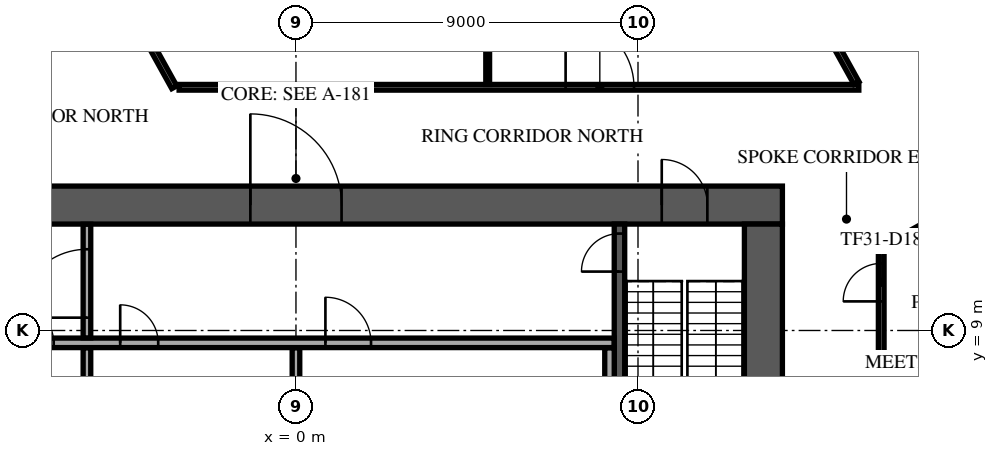
"""IFC4 building model, lengths in metres.
Left out: names, types, materials, properties, quantities, classifications, styles, units other than length and angle.
Written with IfcOpenShell. Run it as: python <this file> out.ifc"""

import sys

from ifc_helpers import new_model, si_unit, direction, frame, frame_2d, origin, place, context, subcontext, project, spatial, rectangle, extrude, element, fill, save


model = new_model("IFC4")
c1 = context("Model", 3, precision=1e-05, world=origin(), true_north=direction((0.0, 1.0)))
c2 = subcontext(c1, "Body", "Model", "MODEL_VIEW")
j1 = project(units=[si_unit("LENGTHUNIT", "METRE"), si_unit("PLANEANGLEUNIT", "RADIAN")], contexts=[c1])
p1 = place(None, origin())
s1 = spatial("IfcSite", under=j1, at=p1, CompositionType="ELEMENT")
p2 = place(p1, origin())
s2 = spatial("IfcBuilding", under=s1, at=p2, CompositionType="ELEMENT")
p3 = place(p2, frame((0.0, 0.0, 135.7)))
s3 = spatial("IfcBuildingStorey", under=s2, at=p3, CompositionType="ELEMENT", Elevation=135.7)
p4 = place(p3, frame((-12.8, 12.3, 0.0), z_axis=(0.0, 0.0, 1.0), x_axis=(1.0, 0.0, 0.0)))
e1 = element("IfcWall", 1, at=p4, inside=s3, PredefinedType="SHEAR", context=c2, shape_type="SweptSolid", body=[
    extrude(rectangle(XDim=25.6, YDim=1.0, at=frame_2d((12.8, 0.0))), origin(), (0.0, 0.0, 1.0), 3.6),
])
p5 = place(p4, frame((11.6, 0.0, 0.0)))
e2 = element("IfcOpeningElement", 2, at=p5, cuts=e1, PredefinedType="OPENING", context=c2, shape_type="SweptSolid", body=[
    extrude(rectangle(XDim=2.4, YDim=2.4, at=frame_2d((1.2, 1.2))), frame((0.0, 0.51, 0.0), z_axis=(0.0, -1.0, 0.0), x_axis=(1.0, 0.0, 0.0)), (0.0, 0.0, 1.0), 1.02),
])
p6 = place(p4, frame((22.425, 0.0, 0.0)))
e3 = element("IfcOpeningElement", 3, at=p6, cuts=e1, PredefinedType="OPENING", context=c2, shape_type="SweptSolid", body=[
    extrude(rectangle(XDim=1.2, YDim=2.1, at=frame_2d((0.6, 1.05))), frame((0.0, 0.51, 0.0), z_axis=(0.0, -1.0, 0.0), x_axis=(1.0, 0.0, 0.0)), (0.0, 0.0, 1.0), 1.02),
])
p7 = place(p4, frame((1.4, 0.0, 0.0)))
e4 = element("IfcOpeningElement", 4, at=p7, cuts=e1, PredefinedType="OPENING", context=c2, shape_type="SweptSolid", body=[
    extrude(rectangle(XDim=1.0, YDim=2.1, at=frame_2d((0.5, 1.05))), frame((0.0, 0.51, 0.0), z_axis=(0.0, -1.0, 0.0), x_axis=(1.0, 0.0, 0.0)), (0.0, 0.0, 1.0), 1.02),
])
p8 = place(p3, frame((12.3, -11.8, 0.0), z_axis=(0.0, 0.0, 1.0), x_axis=(0.0, 1.0, 0.0)))
e5 = element("IfcWall", 5, at=p8, inside=s3, PredefinedType="SHEAR", context=c2, shape_type="SweptSolid", body=[
    extrude(rectangle(XDim=23.6, YDim=1.0, at=frame_2d((11.8, 0.0))), origin(), (0.0, 0.0, 1.0), 3.6),
])
p9 = place(p8, frame((10.6, 0.0, 0.0)))
e6 = element("IfcOpeningElement", 6, at=p9, cuts=e5, PredefinedType="OPENING", context=c2, shape_type="SweptSolid", body=[
    extrude(rectangle(XDim=2.4, YDim=2.4, at=frame_2d((1.2, 1.2))), frame((0.0, 0.51, 0.0), z_axis=(0.0, -1.0, 0.0), x_axis=(1.0, 0.0, 0.0)), (0.0, 0.0, 1.0), 1.02),
])
p10 = place(p3, frame((8.512, 4.55, 0.0), z_axis=(0.0, 0.0, 1.0), x_axis=(0.0, 1.0, 0.0)))
e7 = element("IfcWall", 7, at=p10, inside=s3, PredefinedType="SOLIDWALL", context=c2, shape_type="SweptSolid", body=[
    extrude(rectangle(XDim=7.25, YDim=0.275, at=frame_2d((3.625, 0.0))), origin(), (0.0, 0.0, 1.0), 3.6),
])
p11 = place(p10, frame((6.0, 0.0, 0.0)))
e8 = element("IfcOpeningElement", 8, at=p11, cuts=e7, PredefinedType="OPENING", context=c2, shape_type="SweptSolid", body=[
    extrude(rectangle(XDim=1.0, YDim=2.1, at=frame_2d((0.5, 1.05))), frame((0.0, 0.147, 0.0), z_axis=(0.0, -1.0, 0.0), x_axis=(1.0, 0.0, 0.0)), (0.0, 0.0, 1.0), 0.295),
])
for number, where, z_axis, x_axis in (
    (9, (-5.5, 5.855, 0.0), (0.0, 0.0, 1.0), (0.0, 1.0, 0.0)),
    (10, (0.0, 5.855, 0.0), (0.0, 0.0, 1.0), (0.0, 1.0, 0.0)),
):
    element("IfcWall", number, at=place(p3, frame(where, z_axis=z_axis, x_axis=x_axis)), inside=s3, PredefinedType="PARTITIONING", context=c2, shape_type="SweptSolid", body=[
        extrude(rectangle(XDim=2.69, YDim=0.2, at=frame_2d((1.345, 0.0))), origin(), (0.0, 0.0, 1.0), 3.6),
    ])
p12 = place(p3, frame((8.25, 5.855, 0.0), z_axis=(0.0, 0.0, 1.0), x_axis=(0.0, 1.0, 0.0)))
e11 = element("IfcWall", 11, at=p12, inside=s3, PredefinedType="PARTITIONING", context=c2, shape_type="SweptSolid", body=[
    extrude(rectangle(XDim=2.69, YDim=0.25, at=frame_2d((1.345, 0.0))), origin(), (0.0, 0.0, 1.0), 3.6),
])
p13 = place(p3, frame((-8.35, 8.675, 0.0), z_axis=(0.0, 0.0, 1.0), x_axis=(1.0, 0.0, 0.0)))
e12 = element("IfcWall", 12, at=p13, inside=s3, PredefinedType="PARTITIONING", context=c2, shape_type="SweptSolid", body=[
    extrude(rectangle(XDim=16.72, YDim=0.25, at=frame_2d((8.36, 0.0))), origin(), (0.0, 0.0, 1.0), 3.6),
])
p14 = place(p13, frame((0.975, 0.0, 0.0)))
e13 = element("IfcOpeningElement", 13, at=p14, cuts=e12, PredefinedType="OPENING", context=c2, shape_type="SweptSolid", body=[
    extrude(rectangle(XDim=1.0, YDim=2.1, at=frame_2d((0.5, 1.05))), frame((0.0, 0.135, 0.0), z_axis=(0.0, -1.0, 0.0), x_axis=(1.0, 0.0, 0.0)), (0.0, 0.0, 1.0), 0.27),
])
p15 = place(p13, frame((3.725, 0.0, 0.0)))
e14 = element("IfcOpeningElement", 14, at=p15, cuts=e12, PredefinedType="OPENING", context=c2, shape_type="SweptSolid", body=[
    extrude(rectangle(XDim=1.0, YDim=2.1, at=frame_2d((0.5, 1.05))), frame((0.0, 0.135, 0.0), z_axis=(0.0, -1.0, 0.0), x_axis=(1.0, 0.0, 0.0)), (0.0, 0.0, 1.0), 0.27),
])
p16 = place(p13, frame((9.125, 0.0, 0.0)))
e15 = element("IfcOpeningElement", 15, at=p16, cuts=e12, PredefinedType="OPENING", context=c2, shape_type="SweptSolid", body=[
    extrude(rectangle(XDim=1.2, YDim=2.1, at=frame_2d((0.6, 1.05))), frame((0.0, 0.135, 0.0), z_axis=(0.0, -1.0, 0.0), x_axis=(1.0, 0.0, 0.0)), (0.0, 0.0, 1.0), 0.27),
])
p17 = place(p3, frame((-5.5, 8.805, 0.0), z_axis=(0.0, 0.0, 1.0), x_axis=(0.0, 1.0, 0.0)))
e16 = element("IfcWall", 16, at=p17, inside=s3, PredefinedType="PARTITIONING", context=c2, shape_type="SweptSolid", body=[
    extrude(rectangle(XDim=2.99, YDim=0.2, at=frame_2d((1.495, 0.0))), origin(), (0.0, 0.0, 1.0), 3.6),
])
p18 = place(p17, frame((0.532, 0.0, 0.0)))
e17 = element("IfcOpeningElement", 17, at=p18, cuts=e16, PredefinedType="OPENING", context=c2, shape_type="SweptSolid", body=[
    extrude(rectangle(XDim=1.8, YDim=2.1, at=frame_2d((0.9, 1.05))), frame((0.0, 0.11, 0.0), z_axis=(0.0, -1.0, 0.0), x_axis=(1.0, 0.0, 0.0)), (0.0, 0.0, 1.0), 0.22),
])
p19 = place(p3, frame((8.775, 34.705, 0.0), z_axis=(0.0, 0.0, 1.0), x_axis=(-0.874620778241, -0.484807687922, 0.0)))
e18 = element("IfcWall", 18, at=p19, inside=s3, PredefinedType="STANDARD", context=c2, shape_type="SweptSolid", body=[
    extrude(rectangle(XDim=49.376, YDim=0.6, at=frame_2d((24.688, 0.0))), origin(), (0.0, 0.0, 1.0), 3.6),
])
p20 = place(p19, frame((1.2, 0.0, 0.9)))
e19 = element("IfcOpeningElement", 19, at=p20, cuts=e18, PredefinedType="OPENING", context=c2, shape_type="SweptSolid", body=[
    extrude(rectangle(XDim=2.1, YDim=2.1, at=frame_2d((1.05, 1.05))), frame((0.0, 0.31, 0.0), z_axis=(0.0, -1.0, 0.0), x_axis=(1.0, 0.0, 0.0)), (0.0, 0.0, 1.0), 0.62),
])
p21 = place(p19, frame((5.7, 0.0, 0.9)))
e20 = element("IfcOpeningElement", 20, at=p21, cuts=e18, PredefinedType="OPENING", context=c2, shape_type="SweptSolid", body=[
    extrude(rectangle(XDim=2.1, YDim=2.1, at=frame_2d((1.05, 1.05))), frame((0.0, 0.31, 0.0), z_axis=(0.0, -1.0, 0.0), x_axis=(1.0, 0.0, 0.0)), (0.0, 0.0, 1.0), 0.62),
])
p22 = place(p19, frame((14.7, 0.0, 0.9)))
e21 = element("IfcOpeningElement", 21, at=p22, cuts=e18, PredefinedType="OPENING", context=c2, shape_type="SweptSolid", body=[
    extrude(rectangle(XDim=2.1, YDim=2.1, at=frame_2d((1.05, 1.05))), frame((0.0, 0.31, 0.0), z_axis=(0.0, -1.0, 0.0), x_axis=(1.0, 0.0, 0.0)), (0.0, 0.0, 1.0), 0.62),
])
p23 = place(p19, frame((19.2, 0.0, 0.9)))
e22 = element("IfcOpeningElement", 22, at=p23, cuts=e18, PredefinedType="OPENING", context=c2, shape_type="SweptSolid", body=[
    extrude(rectangle(XDim=2.1, YDim=2.1, at=frame_2d((1.05, 1.05))), frame((0.0, 0.31, 0.0), z_axis=(0.0, -1.0, 0.0), x_axis=(1.0, 0.0, 0.0)), (0.0, 0.0, 1.0), 0.62),
])
p24 = place(p19, frame((23.7, 0.0, 0.9)))
e23 = element("IfcOpeningElement", 23, at=p24, cuts=e18, PredefinedType="OPENING", context=c2, shape_type="SweptSolid", body=[
    extrude(rectangle(XDim=2.1, YDim=2.1, at=frame_2d((1.05, 1.05))), frame((0.0, 0.31, 0.0), z_axis=(0.0, -1.0, 0.0), x_axis=(1.0, 0.0, 0.0)), (0.0, 0.0, 1.0), 0.62),
])
p25 = place(p19, frame((28.2, 0.0, 0.9)))
e24 = element("IfcOpeningElement", 24, at=p25, cuts=e18, PredefinedType="OPENING", context=c2, shape_type="SweptSolid", body=[
    extrude(rectangle(XDim=2.1, YDim=2.1, at=frame_2d((1.05, 1.05))), frame((0.0, 0.31, 0.0), z_axis=(0.0, -1.0, 0.0), x_axis=(1.0, 0.0, 0.0)), (0.0, 0.0, 1.0), 0.62),
])
p26 = place(p19, frame((32.7, 0.0, 0.9)))
e25 = element("IfcOpeningElement", 25, at=p26, cuts=e18, PredefinedType="OPENING", context=c2, shape_type="SweptSolid", body=[
    extrude(rectangle(XDim=2.1, YDim=2.1, at=frame_2d((1.05, 1.05))), frame((0.0, 0.31, 0.0), z_axis=(0.0, -1.0, 0.0), x_axis=(1.0, 0.0, 0.0)), (0.0, 0.0, 1.0), 0.62),
])
p27 = place(p19, frame((37.2, 0.0, 0.9)))
e26 = element("IfcOpeningElement", 26, at=p27, cuts=e18, PredefinedType="OPENING", context=c2, shape_type="SweptSolid", body=[
    extrude(rectangle(XDim=2.1, YDim=2.1, at=frame_2d((1.05, 1.05))), frame((0.0, 0.31, 0.0), z_axis=(0.0, -1.0, 0.0), x_axis=(1.0, 0.0, 0.0)), (0.0, 0.0, 1.0), 0.62),
])
p28 = place(p19, frame((41.7, 0.0, 0.9)))
e27 = element("IfcOpeningElement", 27, at=p28, cuts=e18, PredefinedType="OPENING", context=c2, shape_type="SweptSolid", body=[
    extrude(rectangle(XDim=2.1, YDim=2.1, at=frame_2d((1.05, 1.05))), frame((0.0, 0.31, 0.0), z_axis=(0.0, -1.0, 0.0), x_axis=(1.0, 0.0, 0.0)), (0.0, 0.0, 1.0), 0.62),
])
p29 = place(p19, frame((46.138, 0.0, 0.9)))
e28 = element("IfcOpeningElement", 28, at=p29, cuts=e18, PredefinedType="OPENING", context=c2, shape_type="SweptSolid", body=[
    extrude(rectangle(XDim=2.1, YDim=2.1, at=frame_2d((1.05, 1.05))), frame((0.0, 0.31, 0.0), z_axis=(0.0, -1.0, 0.0), x_axis=(1.0, 0.0, 0.0)), (0.0, 0.0, 1.0), 0.62),
])
p30 = place(p3, frame((36.291, -4.209, 0.0), z_axis=(0.0, 0.0, 1.0), x_axis=(-0.484811111615, 0.874618880458, 0.0)))
e29 = element("IfcWall", 29, at=p30, inside=s3, PredefinedType="STANDARD", context=c2, shape_type="SweptSolid", body=[
    extrude(rectangle(XDim=42.176, YDim=0.6, at=frame_2d((21.088, 0.0))), origin(), (0.0, 0.0, 1.0), 3.6),
])
p31 = place(p30, frame((1.138, 0.0, 0.9)))
e30 = element("IfcOpeningElement", 30, at=p31, cuts=e29, PredefinedType="OPENING", context=c2, shape_type="SweptSolid", body=[
    extrude(rectangle(XDim=2.3, YDim=2.1, at=frame_2d((1.15, 1.05))), frame((0.0, 0.31, 0.0), z_axis=(0.0, -1.0, 0.0), x_axis=(1.0, 0.0, 0.0)), (0.0, 0.0, 1.0), 0.62),
])
p32 = place(p30, frame((5.776, 0.0, 0.9)))
e31 = element("IfcOpeningElement", 31, at=p32, cuts=e29, PredefinedType="OPENING", context=c2, shape_type="SweptSolid", body=[
    extrude(rectangle(XDim=2.3, YDim=2.1, at=frame_2d((1.15, 1.05))), frame((0.0, 0.31, 0.0), z_axis=(0.0, -1.0, 0.0), x_axis=(1.0, 0.0, 0.0)), (0.0, 0.0, 1.0), 0.62),
])
p33 = place(p30, frame((15.176, 0.0, 0.9)))
e32 = element("IfcOpeningElement", 32, at=p33, cuts=e29, PredefinedType="OPENING", context=c2, shape_type="SweptSolid", body=[
    extrude(rectangle(XDim=2.3, YDim=2.1, at=frame_2d((1.15, 1.05))), frame((0.0, 0.31, 0.0), z_axis=(0.0, -1.0, 0.0), x_axis=(1.0, 0.0, 0.0)), (0.0, 0.0, 1.0), 0.62),
])
p34 = place(p30, frame((19.876, 0.0, 0.9)))
e33 = element("IfcOpeningElement", 33, at=p34, cuts=e29, PredefinedType="OPENING", context=c2, shape_type="SweptSolid", body=[
    extrude(rectangle(XDim=2.3, YDim=2.1, at=frame_2d((1.15, 1.05))), frame((0.0, 0.31, 0.0), z_axis=(0.0, -1.0, 0.0), x_axis=(1.0, 0.0, 0.0)), (0.0, 0.0, 1.0), 0.62),
])
p35 = place(p30, frame((24.576, 0.0, 0.9)))
e34 = element("IfcOpeningElement", 34, at=p35, cuts=e29, PredefinedType="OPENING", context=c2, shape_type="SweptSolid", body=[
    extrude(rectangle(XDim=2.3, YDim=2.1, at=frame_2d((1.15, 1.05))), frame((0.0, 0.31, 0.0), z_axis=(0.0, -1.0, 0.0), x_axis=(1.0, 0.0, 0.0)), (0.0, 0.0, 1.0), 0.62),
])
p36 = place(p30, frame((29.276, 0.0, 0.9)))
e35 = element("IfcOpeningElement", 35, at=p36, cuts=e29, PredefinedType="OPENING", context=c2, shape_type="SweptSolid", body=[
    extrude(rectangle(XDim=2.3, YDim=2.1, at=frame_2d((1.15, 1.05))), frame((0.0, 0.31, 0.0), z_axis=(0.0, -1.0, 0.0), x_axis=(1.0, 0.0, 0.0)), (0.0, 0.0, 1.0), 0.62),
])
p37 = place(p30, frame((33.976, 0.0, 0.9)))
e36 = element("IfcOpeningElement", 36, at=p37, cuts=e29, PredefinedType="OPENING", context=c2, shape_type="SweptSolid", body=[
    extrude(rectangle(XDim=2.3, YDim=2.1, at=frame_2d((1.15, 1.05))), frame((0.0, 0.31, 0.0), z_axis=(0.0, -1.0, 0.0), x_axis=(1.0, 0.0, 0.0)), (0.0, 0.0, 1.0), 0.62),
])
p38 = place(p30, frame((38.676, 0.0, 0.9)))
e37 = element("IfcOpeningElement", 37, at=p38, cuts=e29, PredefinedType="OPENING", context=c2, shape_type="SweptSolid", body=[
    extrude(rectangle(XDim=2.3, YDim=2.1, at=frame_2d((1.15, 1.05))), frame((0.0, 0.31, 0.0), z_axis=(0.0, -1.0, 0.0), x_axis=(1.0, 0.0, 0.0)), (0.0, 0.0, 1.0), 0.62),
])
p39 = place(p3, frame((-23.187, 9.123, 0.0), z_axis=(0.0, 0.0, 1.0), x_axis=(0.874618419846, 0.484811942578, 0.0)))
e38 = element("IfcWall", 38, at=p39, inside=s3, PredefinedType="PARTITIONING", context=c2, shape_type="SweptSolid", body=[
    extrude(rectangle(XDim=31.713, YDim=0.15, at=frame_2d((15.857, 0.0))), origin(), (0.0, 0.0, 1.0), 3.15),
])
p40 = place(p39, frame((11.252, 0.0, 0.0)))
e39 = element("IfcOpeningElement", 39, at=p40, cuts=e38, PredefinedType="OPENING", context=c2, shape_type="SweptSolid", body=[
    extrude(rectangle(XDim=1.0, YDim=2.1, at=frame_2d((0.5, 1.05))), frame((0.0, 0.085, 0.0), z_axis=(0.0, -1.0, 0.0), x_axis=(1.0, 0.0, 0.0)), (0.0, 0.0, 1.0), 0.17),
])
p41 = place(p39, frame((19.896, 0.0, 0.0)))
e40 = element("IfcOpeningElement", 40, at=p41, cuts=e38, PredefinedType="OPENING", context=c2, shape_type="SweptSolid", body=[
    extrude(rectangle(XDim=1.0, YDim=2.1, at=frame_2d((0.5, 1.05))), frame((0.0, 0.085, 0.0), z_axis=(0.0, -1.0, 0.0), x_axis=(1.0, 0.0, 0.0)), (0.0, 0.0, 1.0), 0.17),
])
p42 = place(p39, frame((29.223, 0.0, 0.0)))
e41 = element("IfcOpeningElement", 41, at=p42, cuts=e38, PredefinedType="OPENING", context=c2, shape_type="SweptSolid", body=[
    extrude(rectangle(XDim=1.0, YDim=2.1, at=frame_2d((0.5, 1.05))), frame((0.0, 0.085, 0.0), z_axis=(0.0, -1.0, 0.0), x_axis=(1.0, 0.0, 0.0)), (0.0, 0.0, 1.0), 0.17),
])
p43 = place(p3, frame((-4.074, 16.973, 0.0), z_axis=(0.0, 0.0, 1.0), x_axis=(0.484870548803, -0.874585931114, 0.0)))
e42 = element("IfcWall", 42, at=p43, inside=s3, PredefinedType="PARTITIONING", context=c2, shape_type="SweptSolid", body=[
    extrude(rectangle(XDim=1.799, YDim=0.15, at=frame_2d((0.899, 0.0))), origin(), (0.0, 0.0, 1.0), 3.6),
])
p44 = place(p3, frame((-3.075, 15.4, 0.0), z_axis=(0.0, 0.0, 1.0), x_axis=(1.0, 0.0, 0.0)))
e43 = element("IfcWall", 43, at=p44, inside=s3, PredefinedType="PARTITIONING", context=c2, shape_type="SweptSolid", body=[
    extrude(rectangle(XDim=17.886, YDim=0.15, at=frame_2d((8.943, 0.0))), origin(), (0.0, 0.0, 1.0), 3.15),
])
p45 = place(p44, frame((10.17, 0.0, 0.0)))
e44 = element("IfcOpeningElement", 44, at=p45, cuts=e43, PredefinedType="OPENING", context=c2, shape_type="SweptSolid", body=[
    extrude(rectangle(XDim=1.8, YDim=2.1, at=frame_2d((0.9, 1.05))), frame((0.0, 0.085, 0.0), z_axis=(0.0, -1.0, 0.0), x_axis=(1.0, 0.0, 0.0)), (0.0, 0.0, 1.0), 0.17),
])
p46 = place(p3, frame((12.54, 19.497, 0.0), z_axis=(0.0, 0.0, 1.0), x_axis=(0.48474201542, -0.874657177691, 0.0)))
e45 = element("IfcWall", 45, at=p46, inside=s3, PredefinedType="PARTITIONING", context=c2, shape_type="SweptSolid", body=[
    extrude(rectangle(XDim=4.557, YDim=0.15, at=frame_2d((2.279, 0.0))), origin(), (0.0, 0.0, 1.0), 3.15),
])
p47 = place(p3, frame((14.639, 20.66, 0.0), z_axis=(0.0, 0.0, 1.0), x_axis=(0.484803020703, -0.874623365294, 0.0)))
e46 = element("IfcWall", 46, at=p47, inside=s3, PredefinedType="PARTITIONING", context=c2, shape_type="SweptSolid", body=[
    extrude(rectangle(XDim=22.02, YDim=0.15, at=frame_2d((11.01, 0.0))), origin(), (0.0, 0.0, 1.0), 3.15),
])
p48 = place(p47, frame((10.083, 0.0, 0.0)))
e47 = element("IfcOpeningElement", 47, at=p48, cuts=e46, PredefinedType="OPENING", context=c2, shape_type="SweptSolid", body=[
    extrude(rectangle(XDim=1.0, YDim=2.1, at=frame_2d((0.5, 1.05))), frame((0.0, 0.085, 0.0), z_axis=(0.0, -1.0, 0.0), x_axis=(1.0, 0.0, 0.0)), (0.0, 0.0, 1.0), 0.17),
])
p49 = place(p3, frame((15.4, -10.568, 0.0), z_axis=(0.0, 0.0, 1.0), x_axis=(0.0, 1.0, 0.0)))
e48 = element("IfcWall", 48, at=p49, inside=s3, PredefinedType="PARTITIONING", context=c2, shape_type="SweptSolid", body=[
    extrude(rectangle(XDim=21.695, YDim=0.15, at=frame_2d((10.847, 0.0))), origin(), (0.0, 0.0, 1.0), 3.15),
])
p50 = place(p49, frame((20.333, 0.0, 0.0)))
e49 = element("IfcOpeningElement", 49, at=p50, cuts=e48, PredefinedType="OPENING", context=c2, shape_type="SweptSolid", body=[
    extrude(rectangle(XDim=1.0, YDim=2.1, at=frame_2d((0.5, 1.05))), frame((0.0, 0.085, 0.0), z_axis=(0.0, -1.0, 0.0), x_axis=(1.0, 0.0, 0.0)), (0.0, 0.0, 1.0), 0.17),
])
p51 = place(p49, frame((7.55, 0.0, 0.0)))
e50 = element("IfcOpeningElement", 50, at=p51, cuts=e48, PredefinedType="OPENING", context=c2, shape_type="SweptSolid", body=[
    extrude(rectangle(XDim=1.0, YDim=2.1, at=frame_2d((0.5, 1.05))), frame((0.0, 0.085, 0.0), z_axis=(0.0, -1.0, 0.0), x_axis=(1.0, 0.0, 0.0)), (0.0, 0.0, 1.0), 0.17),
])
p52 = place(p3, frame((15.511, 11.189, 0.0), z_axis=(0.0, 0.0, 1.0), x_axis=(0.874559677803, 0.484917900227, 0.0)))
e51 = element("IfcWall", 51, at=p52, inside=s3, PredefinedType="PARTITIONING", context=c2, shape_type="SweptSolid", body=[
    extrude(rectangle(XDim=1.43, YDim=0.15, at=frame_2d((0.715, 0.0))), origin(), (0.0, 0.0, 1.0), 3.6),
])
p53 = place(p3, frame((5.045, 15.475, 0.0), z_axis=(0.0, 0.0, 1.0), x_axis=(0.0, 1.0, 0.0)))
e52 = element("IfcWall", 52, at=p53, inside=s3, PredefinedType="PARTITIONING", context=c2, shape_type="SweptSolid", body=[
    extrude(rectangle(XDim=6.439, YDim=0.1, at=frame_2d((3.22, 0.0))), origin(), (0.0, 0.0, 1.0), 3.6),
])
p54 = place(p5, origin())
e53 = element("IfcDoor", 53, at=p54, inside=s3, OperationType="SINGLE_SWING_LEFT", PredefinedType="DOOR", context=c2, shape_type="SweptSolid", body=[
    extrude(rectangle(XDim=2.4, YDim=2.4, at=frame_2d((1.2, 1.2))), frame((0.0, 0.025, 0.0), z_axis=(0.0, -1.0, 0.0), x_axis=(1.0, 0.0, 0.0)), (0.0, 0.0, 1.0), 0.05),
])
fill(e2, e53)
p55 = place(p6, origin())
e54 = element("IfcDoor", 54, at=p55, inside=s3, OperationType="SINGLE_SWING_LEFT", PredefinedType="DOOR", context=c2, shape_type="SweptSolid", body=[
    extrude(rectangle(XDim=1.2, YDim=2.1, at=frame_2d((0.6, 1.05))), frame((0.0, 0.025, 0.0), z_axis=(0.0, -1.0, 0.0), x_axis=(1.0, 0.0, 0.0)), (0.0, 0.0, 1.0), 0.05),
])
fill(e3, e54)
p56 = place(p11, origin())
e55 = element("IfcDoor", 55, at=p56, inside=s3, OperationType="SINGLE_SWING_LEFT", PredefinedType="DOOR", context=c2, shape_type="SweptSolid", body=[
    extrude(rectangle(XDim=1.0, YDim=2.1, at=frame_2d((0.5, 1.05))), frame((0.0, 0.025, 0.0), z_axis=(0.0, -1.0, 0.0), x_axis=(1.0, 0.0, 0.0)), (0.0, 0.0, 1.0), 0.05),
])
fill(e8, e55)
p57 = place(p14, origin())
e56 = element("IfcDoor", 56, at=p57, inside=s3, OperationType="SINGLE_SWING_RIGHT", PredefinedType="DOOR", context=c2, shape_type="SweptSolid", body=[
    extrude(rectangle(XDim=1.0, YDim=2.1, at=frame_2d((0.5, 1.05))), frame((0.0, 0.025, 0.0), z_axis=(0.0, -1.0, 0.0), x_axis=(1.0, 0.0, 0.0)), (0.0, 0.0, 1.0), 0.05),
])
fill(e13, e56)
p58 = place(p15, origin())
e57 = element("IfcDoor", 57, at=p58, inside=s3, OperationType="SINGLE_SWING_RIGHT", PredefinedType="DOOR", context=c2, shape_type="SweptSolid", body=[
    extrude(rectangle(XDim=1.0, YDim=2.1, at=frame_2d((0.5, 1.05))), frame((0.0, 0.025, 0.0), z_axis=(0.0, -1.0, 0.0), x_axis=(1.0, 0.0, 0.0)), (0.0, 0.0, 1.0), 0.05),
])
fill(e14, e57)
p59 = place(p16, origin())
e58 = element("IfcDoor", 58, at=p59, inside=s3, OperationType="SINGLE_SWING_LEFT", PredefinedType="DOOR", context=c2, shape_type="SweptSolid", body=[
    extrude(rectangle(XDim=1.2, YDim=2.1, at=frame_2d((0.6, 1.05))), frame((0.0, 0.025, 0.0), z_axis=(0.0, -1.0, 0.0), x_axis=(1.0, 0.0, 0.0)), (0.0, 0.0, 1.0), 0.05),
])
fill(e15, e58)
p60 = place(p18, origin())
e59 = element("IfcDoor", 59, at=p60, inside=s3, OperationType="SINGLE_SWING_LEFT", PredefinedType="DOOR", context=c2, shape_type="SweptSolid", body=[
    extrude(rectangle(XDim=1.8, YDim=2.1, at=frame_2d((0.9, 1.05))), frame((0.0, 0.025, 0.0), z_axis=(0.0, -1.0, 0.0), x_axis=(1.0, 0.0, 0.0)), (0.0, 0.0, 1.0), 0.05),
])
fill(e17, e59)
p61 = place(p45, origin())
e60 = element("IfcDoor", 60, at=p61, inside=s3, OperationType="DOUBLE_DOOR_SINGLE_SWING", PredefinedType="DOOR", context=c2, shape_type="SweptSolid", body=[
    extrude(rectangle(XDim=1.8, YDim=2.1, at=frame_2d((0.9, 1.05))), frame((0.0, 0.025, 0.0), z_axis=(0.0, -1.0, 0.0), x_axis=(1.0, 0.0, 0.0)), (0.0, 0.0, 1.0), 0.05),
])
fill(e44, e60)
p62 = place(p50, frame((1.0, 0.0, 0.0), z_axis=(0.0, 0.0, 1.0), x_axis=(-1.0, 0.0, 0.0)))
e61 = element("IfcDoor", 61, at=p62, inside=s3, OperationType="SINGLE_SWING_LEFT", PredefinedType="DOOR", context=c2, shape_type="SweptSolid", body=[
    extrude(rectangle(XDim=1.0, YDim=2.1, at=frame_2d((0.5, 1.05))), frame((0.0, 0.025, 0.0), z_axis=(0.0, -1.0, 0.0), x_axis=(1.0, 0.0, 0.0)), (0.0, 0.0, 1.0), 0.05),
])
fill(e49, e61)
save(model, sys.argv[1])
